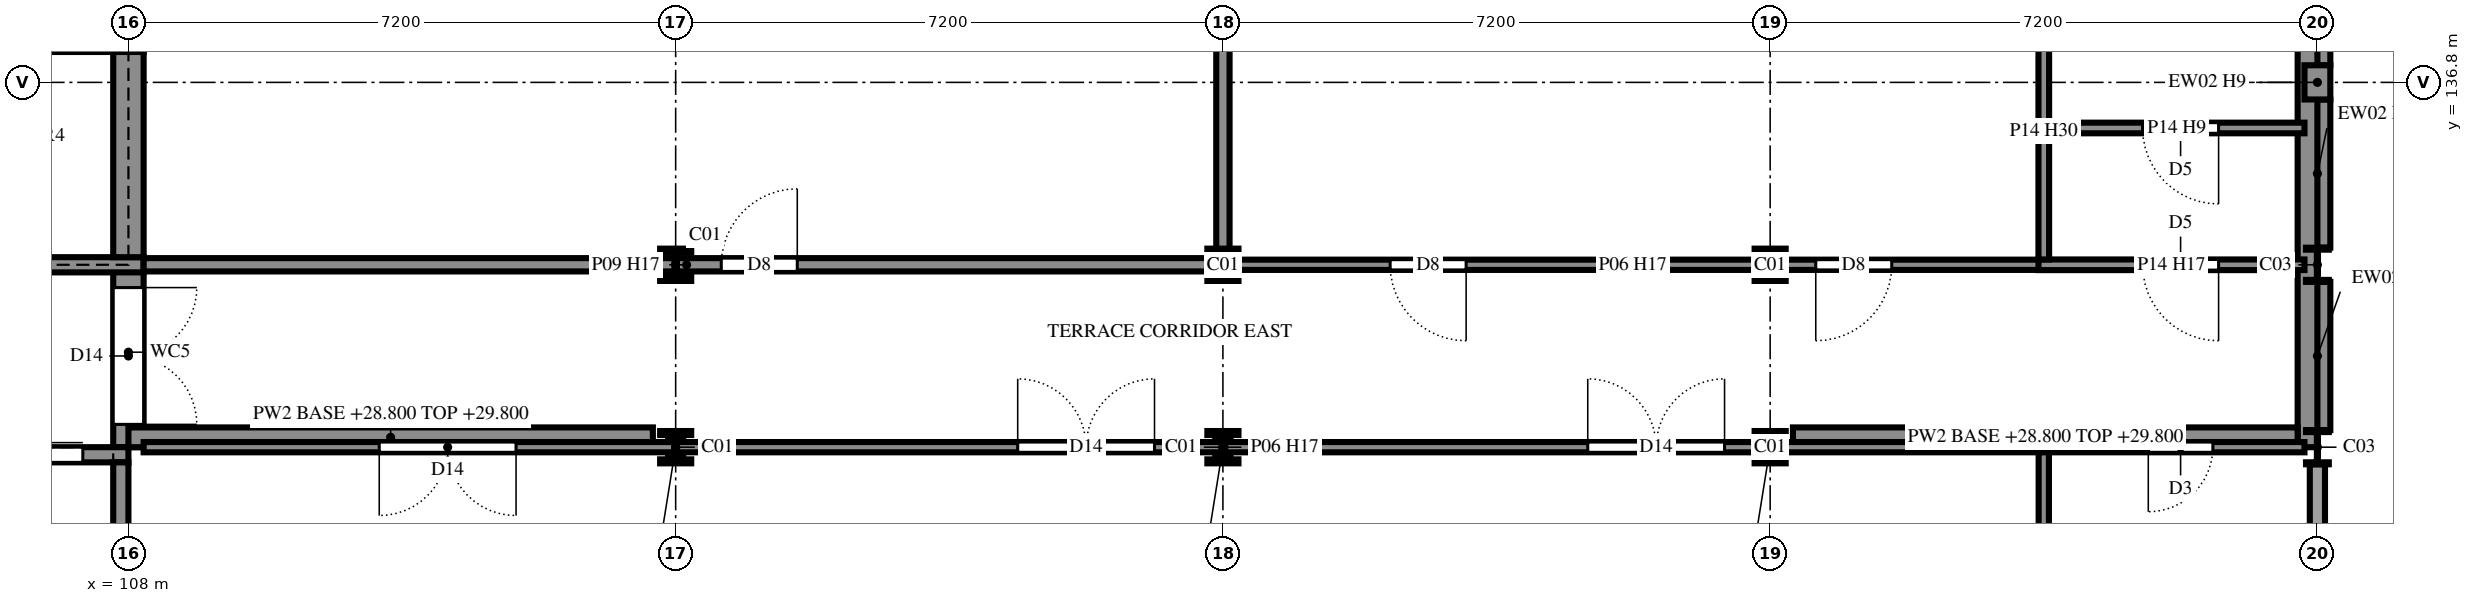
"""IFC4 building model, lengths in metres.
Left out: names, types, materials, properties, quantities, classifications, styles, units other than length and angle.
Written with IfcOpenShell. Run it as: python <this file> out.ifc"""

import sys

from ifc_helpers import new_model, si_unit, direction, frame, frame_2d, origin, origin_2d, place, context, subcontext, project, spatial, rectangle, i_section, extrude, element, fill, save


model = new_model("IFC4")
c1 = context("Model", 3, precision=1e-05, world=origin(), true_north=direction((0.0, 1.0)))
c2 = subcontext(c1, "Body", "Model", "MODEL_VIEW")
j1 = project(units=[si_unit("LENGTHUNIT", "METRE"), si_unit("PLANEANGLEUNIT", "RADIAN")], contexts=[c1])
p1 = place(None, origin())
s1 = spatial("IfcSite", under=j1, at=p1, CompositionType="ELEMENT")
p2 = place(p1, origin())
s2 = spatial("IfcBuilding", under=s1, at=p2, CompositionType="ELEMENT")
p3 = place(p2, frame((0.0, 0.0, 25.2)))
s3 = spatial("IfcBuildingStorey", under=s2, at=p3, CompositionType="ELEMENT", Elevation=25.2)
for number, where, z_axis, x_axis in (
    (1, (115.2, 132.0, 0.0), (0.0, 0.0, 1.0), (1.0, 0.0, 0.0)),
    (2, (115.2, 134.4, 0.0), (0.0, 0.0, 1.0), (1.0, 0.0, 0.0)),
    (3, (122.4, 132.0, 0.0), (0.0, 0.0, 1.0), (1.0, 0.0, 0.0)),
    (4, (122.4, 134.4, 0.0), (0.0, 0.0, 1.0), (1.0, 0.0, 0.0)),
    (5, (129.6, 132.0, 0.0), (0.0, 0.0, 1.0), (1.0, 0.0, 0.0)),
    (6, (129.6, 134.4, 0.0), (0.0, 0.0, 1.0), (1.0, 0.0, 0.0)),
):
    element("IfcColumn", number, at=place(p3, frame(where, z_axis=z_axis, x_axis=x_axis)), inside=s3, PredefinedType="COLUMN", context=c2, shape_type="SweptSolid", body=[
        extrude(i_section(OverallWidth=0.409, OverallDepth=0.425, WebThickness=0.033, FlangeThickness=0.052, FilletRadius=0.015, at=origin_2d()), origin(), (0.0, 0.0, 1.0), 3.6),
    ])
for number, where, z_axis, x_axis in (
    (7, (136.8, 132.0, 0.0), (0.0, 0.0, 1.0), (1.0, 0.0, 0.0)),
    (8, (136.8, 134.4, 0.0), (0.0, 0.0, 1.0), (1.0, 0.0, 0.0)),
):
    element("IfcColumn", number, at=place(p3, frame(where, z_axis=z_axis, x_axis=x_axis)), inside=s3, PredefinedType="COLUMN", context=c2, shape_type="SweptSolid", body=[
        extrude(i_section(OverallWidth=0.3, OverallDepth=0.45, WebThickness=0.014, FlangeThickness=0.026, FilletRadius=0.027, at=origin_2d()), origin(), (0.0, 0.0, 1.0), 3.6),
    ])
p4 = place(p3, frame((108.0, 132.0, 0.0), z_axis=(0.0, 0.0, 1.0), x_axis=(0.0, 1.0, 0.0)))
e9 = element("IfcWall", 9, at=p4, inside=s3, PredefinedType="SHEAR", context=c2, shape_type="SweptSolid", body=[
    extrude(rectangle(XDim=2.5, YDim=0.4, at=frame_2d((1.25, 0.0))), origin(), (0.0, 0.0, 1.0), 3.6),
])
p5 = place(p4, frame((0.3, 0.0, 0.0)))
e10 = element("IfcOpeningElement", 10, at=p5, cuts=e9, PredefinedType="OPENING", context=c2, shape_type="SweptSolid", body=[
    extrude(rectangle(XDim=1.8, YDim=2.1, at=frame_2d((0.9, 1.05))), frame((0.0, 0.21, 0.0), z_axis=(0.0, -1.0, 0.0), x_axis=(1.0, 0.0, 0.0)), (0.0, 0.0, 1.0), 0.42),
])
p6 = place(p3, frame((104.1, 134.4, 0.0), z_axis=(0.0, 0.0, 1.0), x_axis=(1.0, 0.0, 0.0)))
e11 = element("IfcWall", 11, at=p6, inside=s3, PredefinedType="SHEAR", context=c2, shape_type="SweptSolid", body=[
    extrude(rectangle(XDim=4.1, YDim=0.2, at=frame_2d((2.05, 0.0))), origin(), (0.0, 0.0, 1.0), 3.6),
])
p7 = place(p6, frame((1.475, 0.0, 0.0)))
e12 = element("IfcOpeningElement", 12, at=p7, cuts=e11, PredefinedType="OPENING", context=c2, shape_type="SweptSolid", body=[
    extrude(rectangle(XDim=0.85, YDim=2.1, at=frame_2d((0.425, 1.05))), frame((0.0, 0.11, 0.0), z_axis=(0.0, -1.0, 0.0), x_axis=(1.0, 0.0, 0.0)), (0.0, 0.0, 1.0), 0.22),
])
p8 = place(p3, frame((108.0, 134.5, 0.0), z_axis=(0.0, 0.0, 1.0), x_axis=(0.0, 1.0, 0.0)))
e13 = element("IfcWall", 13, at=p8, inside=s3, PredefinedType="SHEAR", context=c2, shape_type="SweptSolid", body=[
    extrude(rectangle(XDim=2.9, YDim=0.4, at=frame_2d((1.45, 0.0))), origin(), (0.0, 0.0, 1.0), 3.6),
])
p9 = place(p3, frame((136.8, 132.225, 0.0), z_axis=(0.0, 0.0, 1.0), x_axis=(0.0, 1.0, 0.0)))
e14 = element("IfcWall", 14, at=p9, inside=s3, PredefinedType="SOLIDWALL", context=c2, shape_type="SweptSolid", body=[
    extrude(rectangle(XDim=1.95, YDim=0.34, at=frame_2d((0.975, 0.0))), origin(), (0.0, 0.0, 1.0), 3.09),
])
p10 = place(p3, frame((136.8, 134.625, 0.0), z_axis=(0.0, 0.0, 1.0), x_axis=(0.0, 1.0, 0.0)))
e15 = element("IfcWall", 15, at=p10, inside=s3, PredefinedType="SOLIDWALL", context=c2, shape_type="SweptSolid", body=[
    extrude(rectangle(XDim=1.95, YDim=0.34, at=frame_2d((0.975, 0.0))), origin(), (0.0, 0.0, 1.0), 3.29),
])
p11 = place(p3, frame((136.8, 137.025, 0.0), z_axis=(0.0, 0.0, 1.0), x_axis=(0.0, 1.0, 0.0)))
e16 = element("IfcWall", 16, at=p11, inside=s3, PredefinedType="SOLIDWALL", context=c2, shape_type="SweptSolid", body=[
    extrude(rectangle(XDim=0.975, YDim=0.34, at=frame_2d((0.488, 0.0))), origin(), (0.0, 0.0, 1.0), 3.29),
])
p12 = place(p3, frame((136.67, 132.0, 3.6), z_axis=(0.0, 0.0, 1.0), x_axis=(0.0, 1.0, 0.0)))
e17 = element("IfcWall", 17, at=p12, inside=s3, PredefinedType="PARAPET", context=c2, shape_type="SweptSolid", body=[
    extrude(rectangle(XDim=12.0, YDim=0.26, at=frame_2d((6.0, 0.0))), origin(), (0.0, 0.0, 1.0), 1.0),
])
p13 = place(p3, frame((108.0, 132.13, 3.6), z_axis=(0.0, 0.0, 1.0), x_axis=(1.0, 0.0, 0.0)))
e18 = element("IfcWall", 18, at=p13, inside=s3, PredefinedType="PARAPET", context=c2, shape_type="SweptSolid", body=[
    extrude(rectangle(XDim=6.9, YDim=0.26, at=frame_2d((3.45, 0.0))), origin(), (0.0, 0.0, 1.0), 1.0),
])
p14 = place(p3, frame((129.9, 132.13, 3.6), z_axis=(0.0, 0.0, 1.0), x_axis=(1.0, 0.0, 0.0)))
e19 = element("IfcWall", 19, at=p14, inside=s3, PredefinedType="PARAPET", context=c2, shape_type="SweptSolid", body=[
    extrude(rectangle(XDim=6.64, YDim=0.26, at=frame_2d((3.32, 0.0))), origin(), (0.0, 0.0, 1.0), 1.0),
])
for number, where, z_axis, x_axis in (
    (20, (115.2, 132.0, 3.6), (0.0, 0.0, 1.0), (1.0, 0.0, 0.0)),
    (21, (122.4, 132.0, 3.6), (0.0, 0.0, 1.0), (1.0, 0.0, 0.0)),
    (22, (129.6, 132.0, 3.6), (0.0, 0.0, 1.0), (1.0, 0.0, 0.0)),
):
    element("IfcColumn", number, at=place(p3, frame(where, z_axis=z_axis, x_axis=x_axis)), inside=s3, PredefinedType="COLUMN", context=c2, shape_type="SweptSolid", body=[
        extrude(i_section(OverallWidth=0.2, OverallDepth=0.2, WebThickness=0.009, FlangeThickness=0.015, FilletRadius=0.018, at=origin_2d()), origin(), (0.0, 0.0, 1.0), 3.583),
    ])
p15 = place(p3, frame((136.8, 136.575, 0.0), z_axis=(0.0, 0.0, 1.0), x_axis=(0.0, 1.0, 0.0)))
e23 = element("IfcWall", 23, at=p15, inside=s3, PredefinedType="SOLIDWALL", context=c2, shape_type="SweptSolid", body=[
    extrude(rectangle(XDim=0.45, YDim=0.34, at=frame_2d((0.225, 0.0))), origin(), (0.0, 0.0, 1.0), 3.29),
])
p16 = place(p3, frame((105.6, 131.9, 0.0), z_axis=(0.0, 0.0, 1.0), x_axis=(1.0, 0.0, 0.0)))
e24 = element("IfcWall", 24, at=p16, inside=s3, PredefinedType="SHEAR", context=c2, shape_type="SweptSolid", body=[
    extrude(rectangle(XDim=2.4, YDim=0.2, at=frame_2d((1.2, 0.0))), origin(), (0.0, 0.0, 1.0), 4.5),
])
p17 = place(p16, frame((0.6, 0.0, 0.0)))
e25 = element("IfcOpeningElement", 25, at=p17, cuts=e24, PredefinedType="OPENING", context=c2, shape_type="SweptSolid", body=[
    extrude(rectangle(XDim=1.2, YDim=2.1, at=frame_2d((0.6, 1.05))), frame((0.0, 0.11, 0.0), z_axis=(0.0, -1.0, 0.0), x_axis=(1.0, 0.0, 0.0)), (0.0, 0.0, 1.0), 0.22),
])
p18 = place(p3, frame((107.9, 129.3, 0.0), z_axis=(0.0, 0.0, 1.0), x_axis=(0.0, 1.0, 0.0)))
e26 = element("IfcWall", 26, at=p18, inside=s3, PredefinedType="SHEAR", context=c2, shape_type="SweptSolid", body=[
    extrude(rectangle(XDim=2.5, YDim=0.2, at=frame_2d((1.25, 0.0))), origin(), (0.0, 0.0, 1.0), 4.5),
])
p19 = place(p3, frame((108.2, 132.0, 0.0), z_axis=(0.0, 0.0, 1.0), x_axis=(1.0, 0.0, 0.0)))
e27 = element("IfcWall", 27, at=p19, inside=s3, PredefinedType="PARTITIONING", context=c2, shape_type="SweptSolid", body=[
    extrude(rectangle(XDim=28.43, YDim=0.135, at=frame_2d((14.215, 0.0))), origin(), (0.0, 0.0, 1.0), 2.99),
])
p20 = place(p19, frame((26.375, 0.0, 0.0)))
e28 = element("IfcOpeningElement", 28, at=p20, cuts=e27, PredefinedType="OPENING", context=c2, shape_type="SweptSolid", body=[
    extrude(rectangle(XDim=0.85, YDim=2.1, at=frame_2d((0.425, 1.05))), frame((0.0, 0.077, 0.0), z_axis=(0.0, -1.0, 0.0), x_axis=(1.0, 0.0, 0.0)), (0.0, 0.0, 1.0), 0.155),
])
p21 = place(p19, frame((3.1, 0.0, 0.0)))
e29 = element("IfcOpeningElement", 29, at=p21, cuts=e27, PredefinedType="OPENING", context=c2, shape_type="SweptSolid", body=[
    extrude(rectangle(XDim=1.8, YDim=2.1, at=frame_2d((0.9, 1.05))), frame((0.0, 0.077, 0.0), z_axis=(0.0, -1.0, 0.0), x_axis=(1.0, 0.0, 0.0)), (0.0, 0.0, 1.0), 0.155),
])
p22 = place(p19, frame((11.5, 0.0, 0.0)))
e30 = element("IfcOpeningElement", 30, at=p22, cuts=e27, PredefinedType="OPENING", context=c2, shape_type="SweptSolid", body=[
    extrude(rectangle(XDim=1.8, YDim=2.1, at=frame_2d((0.9, 1.05))), frame((0.0, 0.077, 0.0), z_axis=(0.0, -1.0, 0.0), x_axis=(1.0, 0.0, 0.0)), (0.0, 0.0, 1.0), 0.155),
])
p23 = place(p19, frame((19.0, 0.0, 0.0)))
e31 = element("IfcOpeningElement", 31, at=p23, cuts=e27, PredefinedType="OPENING", context=c2, shape_type="SweptSolid", body=[
    extrude(rectangle(XDim=1.8, YDim=2.1, at=frame_2d((0.9, 1.05))), frame((0.0, 0.077, 0.0), z_axis=(0.0, -1.0, 0.0), x_axis=(1.0, 0.0, 0.0)), (0.0, 0.0, 1.0), 0.155),
])
p24 = place(p3, frame((108.2, 134.4, 0.0), z_axis=(0.0, 0.0, 1.0), x_axis=(1.0, 0.0, 0.0)))
e32 = element("IfcWall", 32, at=p24, inside=s3, PredefinedType="PARTITIONING", context=c2, shape_type="SweptSolid", body=[
    extrude(rectangle(XDim=14.288, YDim=0.175, at=frame_2d((7.144, 0.0))), origin(), (0.0, 0.0, 1.0), 2.99),
])
p25 = place(p24, frame((7.6, 0.0, 0.0)))
e33 = element("IfcOpeningElement", 33, at=p25, cuts=e32, PredefinedType="OPENING", context=c2, shape_type="SweptSolid", body=[
    extrude(rectangle(XDim=1.0, YDim=2.4, at=frame_2d((0.5, 1.2))), frame((0.0, 0.097, 0.0), z_axis=(0.0, -1.0, 0.0), x_axis=(1.0, 0.0, 0.0)), (0.0, 0.0, 1.0), 0.195),
])
p26 = place(p3, frame((122.312, 134.4, 0.0), z_axis=(0.0, 0.0, 1.0), x_axis=(1.0, 0.0, 0.0)))
e34 = element("IfcWall", 34, at=p26, inside=s3, PredefinedType="PARTITIONING", context=c2, shape_type="SweptSolid", body=[
    extrude(rectangle(XDim=10.958, YDim=0.135, at=frame_2d((5.479, 0.0))), origin(), (0.0, 0.0, 1.0), 2.99),
])
p27 = place(p26, frame((2.288, 0.0, 0.0)))
e35 = element("IfcOpeningElement", 35, at=p27, cuts=e34, PredefinedType="OPENING", context=c2, shape_type="SweptSolid", body=[
    extrude(rectangle(XDim=1.0, YDim=2.4, at=frame_2d((0.5, 1.2))), frame((0.0, 0.077, 0.0), z_axis=(0.0, -1.0, 0.0), x_axis=(1.0, 0.0, 0.0)), (0.0, 0.0, 1.0), 0.155),
])
p28 = place(p26, frame((7.887, 0.0, 0.0)))
e36 = element("IfcOpeningElement", 36, at=p28, cuts=e34, PredefinedType="OPENING", context=c2, shape_type="SweptSolid", body=[
    extrude(rectangle(XDim=1.0, YDim=2.4, at=frame_2d((0.5, 1.2))), frame((0.0, 0.077, 0.0), z_axis=(0.0, -1.0, 0.0), x_axis=(1.0, 0.0, 0.0)), (0.0, 0.0, 1.0), 0.155),
])
p29 = place(p3, frame((133.13, 134.4, 0.0), z_axis=(0.0, 0.0, 1.0), x_axis=(1.0, 0.0, 0.0)))
e37 = element("IfcWall", 37, at=p29, inside=s3, PredefinedType="PARTITIONING", context=c2, shape_type="SweptSolid", body=[
    extrude(rectangle(XDim=3.5, YDim=0.14, at=frame_2d((1.75, 0.0))), origin(), (0.0, 0.0, 1.0), 2.99),
])
p30 = place(p29, frame((1.37, 0.0, 0.0)))
e38 = element("IfcOpeningElement", 38, at=p30, cuts=e37, PredefinedType="OPENING", context=c2, shape_type="SweptSolid", body=[
    extrude(rectangle(XDim=1.0, YDim=2.1, at=frame_2d((0.5, 1.05))), frame((0.0, 0.08, 0.0), z_axis=(0.0, -1.0, 0.0), x_axis=(1.0, 0.0, 0.0)), (0.0, 0.0, 1.0), 0.16),
])
p31 = place(p3, frame((133.27, 136.2, 0.0), z_axis=(0.0, 0.0, 1.0), x_axis=(1.0, 0.0, 0.0)))
e39 = element("IfcWall", 39, at=p31, inside=s3, PredefinedType="PARTITIONING", context=c2, shape_type="SweptSolid", body=[
    extrude(rectangle(XDim=3.36, YDim=0.14, at=frame_2d((1.68, 0.0))), origin(), (0.0, 0.0, 1.0), 3.29),
])
p32 = place(p31, frame((1.23, 0.0, 0.0)))
e40 = element("IfcOpeningElement", 40, at=p32, cuts=e39, PredefinedType="OPENING", context=c2, shape_type="SweptSolid", body=[
    extrude(rectangle(XDim=1.0, YDim=2.1, at=frame_2d((0.5, 1.05))), frame((0.0, 0.08, 0.0), z_axis=(0.0, -1.0, 0.0), x_axis=(1.0, 0.0, 0.0)), (0.0, 0.0, 1.0), 0.16),
])
p33 = place(p3, frame((122.4, 134.488, 0.0), z_axis=(0.0, 0.0, 1.0), x_axis=(0.0, 1.0, 0.0)))
e41 = element("IfcWall", 41, at=p33, inside=s3, PredefinedType="PARTITIONING", context=c2, shape_type="SweptSolid", body=[
    extrude(rectangle(XDim=9.343, YDim=0.175, at=frame_2d((4.671, 0.0))), origin(), (0.0, 0.0, 1.0), 2.89),
])
p34 = place(p3, frame((133.2, 122.57, 0.0), z_axis=(0.0, 0.0, 1.0), x_axis=(0.0, 1.0, 0.0)))
e42 = element("IfcWall", 42, at=p34, inside=s3, PredefinedType="PARTITIONING", context=c2, shape_type="SweptSolid", body=[
    extrude(rectangle(XDim=9.363, YDim=0.135, at=frame_2d((4.681, 0.0))), origin(), (0.0, 0.0, 1.0), 2.89),
])
p35 = place(p3, frame((133.2, 134.47, 0.0), z_axis=(0.0, 0.0, 1.0), x_axis=(0.0, 1.0, 0.0)))
e43 = element("IfcWall", 43, at=p35, inside=s3, PredefinedType="PARTITIONING", context=c2, shape_type="SweptSolid", body=[
    extrude(rectangle(XDim=3.38, YDim=0.14, at=frame_2d((1.69, 0.0))), origin(), (0.0, 0.0, 1.0), 2.89),
])
p36 = place(p17, origin())
e44 = element("IfcDoor", 44, at=p36, inside=s3, OperationType="SLIDING_TO_LEFT", PredefinedType="DOOR", context=c2, shape_type="SweptSolid", body=[
    extrude(rectangle(XDim=1.2, YDim=2.1, at=frame_2d((0.6, 1.05))), frame((0.0, 0.025, 0.0), z_axis=(0.0, -1.0, 0.0), x_axis=(1.0, 0.0, 0.0)), (0.0, 0.0, 1.0), 0.05),
])
fill(e25, e44)
p37 = place(p20, frame((0.85, 0.0, 0.0), z_axis=(0.0, 0.0, 1.0), x_axis=(-1.0, 0.0, 0.0)))
e45 = element("IfcDoor", 45, at=p37, inside=s3, OperationType="SINGLE_SWING_LEFT", PredefinedType="DOOR", context=c2, shape_type="SweptSolid", body=[
    extrude(rectangle(XDim=0.85, YDim=2.1, at=frame_2d((0.425, 1.05))), frame((0.0, 0.025, 0.0), z_axis=(0.0, -1.0, 0.0), x_axis=(1.0, 0.0, 0.0)), (0.0, 0.0, 1.0), 0.05),
])
fill(e28, e45)
p38 = place(p21, frame((1.8, 0.0, 0.0), z_axis=(0.0, 0.0, 1.0), x_axis=(-1.0, 0.0, 0.0)))
e46 = element("IfcDoor", 46, at=p38, inside=s3, OperationType="DOUBLE_DOOR_SINGLE_SWING", PredefinedType="DOOR", context=c2, shape_type="SweptSolid", body=[
    extrude(rectangle(XDim=1.8, YDim=2.1, at=frame_2d((0.9, 1.05))), frame((0.0, 0.025, 0.0), z_axis=(0.0, -1.0, 0.0), x_axis=(1.0, 0.0, 0.0)), (0.0, 0.0, 1.0), 0.05),
])
fill(e29, e46)
p39 = place(p22, origin())
e47 = element("IfcDoor", 47, at=p39, inside=s3, OperationType="DOUBLE_DOOR_SINGLE_SWING", PredefinedType="DOOR", context=c2, shape_type="SweptSolid", body=[
    extrude(rectangle(XDim=1.8, YDim=2.1, at=frame_2d((0.9, 1.05))), frame((0.0, 0.025, 0.0), z_axis=(0.0, -1.0, 0.0), x_axis=(1.0, 0.0, 0.0)), (0.0, 0.0, 1.0), 0.05),
])
fill(e30, e47)
p40 = place(p23, origin())
e48 = element("IfcDoor", 48, at=p40, inside=s3, OperationType="DOUBLE_DOOR_SINGLE_SWING", PredefinedType="DOOR", context=c2, shape_type="SweptSolid", body=[
    extrude(rectangle(XDim=1.8, YDim=2.1, at=frame_2d((0.9, 1.05))), frame((0.0, 0.025, 0.0), z_axis=(0.0, -1.0, 0.0), x_axis=(1.0, 0.0, 0.0)), (0.0, 0.0, 1.0), 0.05),
])
fill(e31, e48)
p41 = place(p25, origin())
e49 = element("IfcDoor", 49, at=p41, inside=s3, OperationType="SINGLE_SWING_LEFT", PredefinedType="DOOR", context=c2, shape_type="SweptSolid", body=[
    extrude(rectangle(XDim=1.0, YDim=2.4, at=frame_2d((0.5, 1.2))), frame((0.0, 0.025, 0.0), z_axis=(0.0, -1.0, 0.0), x_axis=(1.0, 0.0, 0.0)), (0.0, 0.0, 1.0), 0.05),
])
fill(e33, e49)
p42 = place(p27, frame((1.0, 0.0, 0.0), z_axis=(0.0, 0.0, 1.0), x_axis=(-1.0, 0.0, 0.0)))
e50 = element("IfcDoor", 50, at=p42, inside=s3, OperationType="SINGLE_SWING_RIGHT", PredefinedType="DOOR", context=c2, shape_type="SweptSolid", body=[
    extrude(rectangle(XDim=1.0, YDim=2.4, at=frame_2d((0.5, 1.2))), frame((0.0, 0.025, 0.0), z_axis=(0.0, -1.0, 0.0), x_axis=(1.0, 0.0, 0.0)), (0.0, 0.0, 1.0), 0.05),
])
fill(e35, e50)
p43 = place(p28, frame((1.0, 0.0, 0.0), z_axis=(0.0, 0.0, 1.0), x_axis=(-1.0, 0.0, 0.0)))
e51 = element("IfcDoor", 51, at=p43, inside=s3, OperationType="SINGLE_SWING_LEFT", PredefinedType="DOOR", context=c2, shape_type="SweptSolid", body=[
    extrude(rectangle(XDim=1.0, YDim=2.4, at=frame_2d((0.5, 1.2))), frame((0.0, 0.025, 0.0), z_axis=(0.0, -1.0, 0.0), x_axis=(1.0, 0.0, 0.0)), (0.0, 0.0, 1.0), 0.05),
])
fill(e36, e51)
p44 = place(p30, frame((1.0, 0.0, 0.0), z_axis=(0.0, 0.0, 1.0), x_axis=(-1.0, 0.0, 0.0)))
e52 = element("IfcDoor", 52, at=p44, inside=s3, OperationType="SINGLE_SWING_RIGHT", PredefinedType="DOOR", context=c2, shape_type="SweptSolid", body=[
    extrude(rectangle(XDim=1.0, YDim=2.1, at=frame_2d((0.5, 1.05))), frame((0.0, 0.025, 0.0), z_axis=(0.0, -1.0, 0.0), x_axis=(1.0, 0.0, 0.0)), (0.0, 0.0, 1.0), 0.05),
])
fill(e38, e52)
p45 = place(p32, frame((1.0, 0.0, 0.0), z_axis=(0.0, 0.0, 1.0), x_axis=(-1.0, 0.0, 0.0)))
e53 = element("IfcDoor", 53, at=p45, inside=s3, OperationType="SINGLE_SWING_RIGHT", PredefinedType="DOOR", context=c2, shape_type="SweptSolid", body=[
    extrude(rectangle(XDim=1.0, YDim=2.1, at=frame_2d((0.5, 1.05))), frame((0.0, 0.025, 0.0), z_axis=(0.0, -1.0, 0.0), x_axis=(1.0, 0.0, 0.0)), (0.0, 0.0, 1.0), 0.05),
])
fill(e40, e53)
p46 = place(p5, frame((1.8, 0.0, 0.0), z_axis=(0.0, 0.0, 1.0), x_axis=(-1.0, 0.0, 0.0)))
e54 = element("IfcDoor", 54, at=p46, inside=s3, OperationType="DOUBLE_DOOR_SINGLE_SWING", PredefinedType="DOOR", context=c2, shape_type="SweptSolid", body=[
    extrude(rectangle(XDim=1.8, YDim=2.1, at=frame_2d((0.9, 1.05))), frame((0.0, 0.025, 0.0), z_axis=(0.0, -1.0, 0.0), x_axis=(1.0, 0.0, 0.0)), (0.0, 0.0, 1.0), 0.05),
])
fill(e10, e54)
save(model, sys.argv[1])
